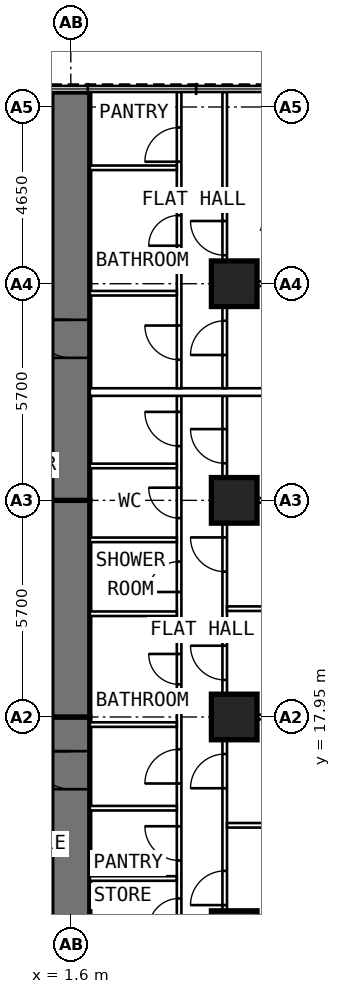
"""IFC4 building model, lengths in metres.
Left out: names, types, materials, properties, quantities, classifications, styles, units other than length and angle.
Written with IfcOpenShell. Run it as: python <this file> out.ifc"""

import sys

from ifc_helpers import new_model, si_unit, direction, frame, frame_2d, origin, origin_2d, place, context, subcontext, project, spatial, rectangle, extrude, element, fill, save


model = new_model("IFC4")
c1 = context("Model", 3, precision=1e-05, world=origin(), true_north=direction((0.0, 1.0)))
c2 = subcontext(c1, "Body", "Model", "MODEL_VIEW")
j1 = project(units=[si_unit("LENGTHUNIT", "METRE"), si_unit("PLANEANGLEUNIT", "RADIAN")], contexts=[c1])
p1 = place(None, origin())
s1 = spatial("IfcSite", under=j1, at=p1, CompositionType="ELEMENT")
p2 = place(p1, origin())
s2 = spatial("IfcBuilding", under=s1, at=p2, CompositionType="ELEMENT")
p3 = place(p2, frame((0.0, 0.0, 53.8)))
s3 = spatial("IfcBuildingStorey", under=s2, at=p3, CompositionType="ELEMENT", Elevation=53.8)
for number, where, z_axis, x_axis in (
    (1, (5.9, 12.25, 0.0), (0.0, 0.0, 1.0), (0.0, 1.0, 0.0)),
    (2, (5.9, 17.95, 0.0), (0.0, 0.0, 1.0), (0.0, 1.0, 0.0)),
    (3, (5.9, 23.65, 0.0), (0.0, 0.0, 1.0), (0.0, 1.0, 0.0)),
    (4, (5.9, 29.35, 0.0), (0.0, 0.0, 1.0), (0.0, 1.0, 0.0)),
):
    element("IfcColumn", number, at=place(p3, frame(where, z_axis=z_axis, x_axis=x_axis)), inside=s3, PredefinedType="COLUMN", context=c2, shape_type="SweptSolid", body=[
        extrude(rectangle(XDim=1.2, YDim=1.2, at=origin_2d()), origin(), (0.0, 0.0, 1.0), 3.6),
    ])
p4 = place(p3, frame((1.6, 9.6, 0.0), z_axis=(0.0, 0.0, 1.0), x_axis=(0.0, 1.0, 0.0)))
e5 = element("IfcWall", 5, at=p4, inside=s3, PredefinedType="SHEAR", context=c2, shape_type="SweptSolid", body=[
    extrude(rectangle(XDim=8.35, YDim=1.0, at=frame_2d((4.175, 0.0))), origin(), (0.0, 0.0, 1.0), 3.6),
])
p5 = place(p4, frame((6.45, 0.0, 0.0)))
e6 = element("IfcOpeningElement", 6, at=p5, cuts=e5, PredefinedType="OPENING", context=c2, shape_type="SweptSolid", body=[
    extrude(rectangle(XDim=1.0, YDim=2.1, at=frame_2d((0.5, 1.05))), frame((0.0, 0.512, 0.0), z_axis=(0.0, -1.0, 0.0), x_axis=(1.0, 0.0, 0.0)), (0.0, 0.0, 1.0), 1.024),
])
p6 = place(p3, frame((1.6, 17.95, 0.0), z_axis=(0.0, 0.0, 1.0), x_axis=(0.0, 1.0, 0.0)))
e7 = element("IfcWall", 7, at=p6, inside=s3, PredefinedType="SHEAR", context=c2, shape_type="SweptSolid", body=[
    extrude(rectangle(XDim=5.7, YDim=1.0, at=frame_2d((2.85, 0.0))), origin(), (0.0, 0.0, 1.0), 3.6),
])
p7 = place(p3, frame((1.6, 23.65, 0.0), z_axis=(0.0, 0.0, 1.0), x_axis=(0.0, 1.0, 0.0)))
e8 = element("IfcWall", 8, at=p7, inside=s3, PredefinedType="SHEAR", context=c2, shape_type="SweptSolid", body=[
    extrude(rectangle(XDim=10.745, YDim=1.0, at=frame_2d((5.373, 0.0))), origin(), (0.0, 0.0, 1.0), 3.6),
])
p8 = place(p7, frame((3.75, 0.0, 0.0)))
e9 = element("IfcOpeningElement", 9, at=p8, cuts=e8, PredefinedType="OPENING", context=c2, shape_type="SweptSolid", body=[
    extrude(rectangle(XDim=1.0, YDim=2.1, at=frame_2d((0.5, 1.05))), frame((0.0, 0.512, 0.0), z_axis=(0.0, -1.0, 0.0), x_axis=(1.0, 0.0, 0.0)), (0.0, 0.0, 1.0), 1.024),
])
p9 = place(p3, frame((4.45, 10.1, 0.0), z_axis=(0.0, 0.0, 1.0), x_axis=(0.0, 1.0, 0.0)))
e10 = element("IfcWall", 10, at=p9, inside=s3, PredefinedType="PARTITIONING", context=c2, shape_type="SweptSolid", body=[
    extrude(rectangle(XDim=16.3, YDim=0.12, at=frame_2d((8.15, 0.0))), origin(), (0.0, 0.0, 1.0), 3.35),
])
p10 = place(p9, frame((0.375, 0.0, 0.0)))
e11 = element("IfcOpeningElement", 11, at=p10, cuts=e10, PredefinedType="OPENING", context=c2, shape_type="SweptSolid", body=[
    extrude(rectangle(XDim=0.9, YDim=2.1, at=frame_2d((0.45, 1.05))), frame((0.0, 0.072, 0.0), z_axis=(0.0, -1.0, 0.0), x_axis=(1.0, 0.0, 0.0)), (0.0, 0.0, 1.0), 0.144),
])
p11 = place(p9, frame((2.275, 0.0, 0.0)))
e12 = element("IfcOpeningElement", 12, at=p11, cuts=e10, PredefinedType="OPENING", context=c2, shape_type="SweptSolid", body=[
    extrude(rectangle(XDim=0.8, YDim=2.1, at=frame_2d((0.4, 1.05))), frame((0.0, 0.072, 0.0), z_axis=(0.0, -1.0, 0.0), x_axis=(1.0, 0.0, 0.0)), (0.0, 0.0, 1.0), 0.144),
])
p12 = place(p9, frame((4.075, 0.0, 0.0)))
e13 = element("IfcOpeningElement", 13, at=p12, cuts=e10, PredefinedType="OPENING", context=c2, shape_type="SweptSolid", body=[
    extrude(rectangle(XDim=0.9, YDim=2.1, at=frame_2d((0.45, 1.05))), frame((0.0, 0.072, 0.0), z_axis=(0.0, -1.0, 0.0), x_axis=(1.0, 0.0, 0.0)), (0.0, 0.0, 1.0), 0.144),
])
p13 = place(p9, frame((6.1, 0.0, 0.0)))
e14 = element("IfcOpeningElement", 14, at=p13, cuts=e10, PredefinedType="OPENING", context=c2, shape_type="SweptSolid", body=[
    extrude(rectangle(XDim=0.9, YDim=2.1, at=frame_2d((0.45, 1.05))), frame((0.0, 0.072, 0.0), z_axis=(0.0, -1.0, 0.0), x_axis=(1.0, 0.0, 0.0)), (0.0, 0.0, 1.0), 0.144),
])
p14 = place(p9, frame((8.708, 0.0, 0.0)))
e15 = element("IfcOpeningElement", 15, at=p14, cuts=e10, PredefinedType="OPENING", context=c2, shape_type="SweptSolid", body=[
    extrude(rectangle(XDim=0.8, YDim=2.1, at=frame_2d((0.4, 1.05))), frame((0.0, 0.072, 0.0), z_axis=(0.0, -1.0, 0.0), x_axis=(1.0, 0.0, 0.0)), (0.0, 0.0, 1.0), 0.144),
])
p15 = place(p9, frame((11.139, 0.0, 0.0)))
e16 = element("IfcOpeningElement", 16, at=p15, cuts=e10, PredefinedType="OPENING", context=c2, shape_type="SweptSolid", body=[
    extrude(rectangle(XDim=0.8, YDim=2.1, at=frame_2d((0.4, 1.05))), frame((0.0, 0.072, 0.0), z_axis=(0.0, -1.0, 0.0), x_axis=(1.0, 0.0, 0.0)), (0.0, 0.0, 1.0), 0.144),
])
p16 = place(p9, frame((13.083, 0.0, 0.0)))
e17 = element("IfcOpeningElement", 17, at=p16, cuts=e10, PredefinedType="OPENING", context=c2, shape_type="SweptSolid", body=[
    extrude(rectangle(XDim=0.8, YDim=2.1, at=frame_2d((0.4, 1.05))), frame((0.0, 0.072, 0.0), z_axis=(0.0, -1.0, 0.0), x_axis=(1.0, 0.0, 0.0)), (0.0, 0.0, 1.0), 0.144),
])
p17 = place(p9, frame((14.978, 0.0, 0.0)))
e18 = element("IfcOpeningElement", 18, at=p17, cuts=e10, PredefinedType="OPENING", context=c2, shape_type="SweptSolid", body=[
    extrude(rectangle(XDim=0.9, YDim=2.1, at=frame_2d((0.45, 1.05))), frame((0.0, 0.072, 0.0), z_axis=(0.0, -1.0, 0.0), x_axis=(1.0, 0.0, 0.0)), (0.0, 0.0, 1.0), 0.144),
])
p18 = place(p3, frame((5.65, 9.6, 0.0), z_axis=(0.0, 0.0, 1.0), x_axis=(0.0, 1.0, 0.0)))
e19 = element("IfcWall", 19, at=p18, inside=s3, PredefinedType="PARTITIONING", context=c2, shape_type="SweptSolid", body=[
    extrude(rectangle(XDim=16.8, YDim=0.12, at=frame_2d((8.4, 0.0))), origin(), (0.0, 0.0, 1.0), 3.35),
])
p19 = place(p18, frame((3.4, 0.0, 0.0)))
e20 = element("IfcOpeningElement", 20, at=p19, cuts=e19, PredefinedType="OPENING", context=c2, shape_type="SweptSolid", body=[
    extrude(rectangle(XDim=0.9, YDim=2.1, at=frame_2d((0.45, 1.05))), frame((0.0, 0.072, 0.0), z_axis=(0.0, -1.0, 0.0), x_axis=(1.0, 0.0, 0.0)), (0.0, 0.0, 1.0), 0.144),
])
p20 = place(p18, frame((6.475, 0.0, 0.0)))
e21 = element("IfcOpeningElement", 21, at=p20, cuts=e19, PredefinedType="OPENING", context=c2, shape_type="SweptSolid", body=[
    extrude(rectangle(XDim=0.9, YDim=2.1, at=frame_2d((0.45, 1.05))), frame((0.0, 0.072, 0.0), z_axis=(0.0, -1.0, 0.0), x_axis=(1.0, 0.0, 0.0)), (0.0, 0.0, 1.0), 0.144),
])
p21 = place(p18, frame((9.325, 0.0, 0.0)))
e22 = element("IfcOpeningElement", 22, at=p21, cuts=e19, PredefinedType="OPENING", context=c2, shape_type="SweptSolid", body=[
    extrude(rectangle(XDim=0.9, YDim=2.1, at=frame_2d((0.45, 1.05))), frame((0.0, 0.072, 0.0), z_axis=(0.0, -1.0, 0.0), x_axis=(1.0, 0.0, 0.0)), (0.0, 0.0, 1.0), 0.144),
])
p22 = place(p18, frame((12.175, 0.0, 0.0)))
e23 = element("IfcOpeningElement", 23, at=p22, cuts=e19, PredefinedType="OPENING", context=c2, shape_type="SweptSolid", body=[
    extrude(rectangle(XDim=0.9, YDim=2.1, at=frame_2d((0.45, 1.05))), frame((0.0, 0.072, 0.0), z_axis=(0.0, -1.0, 0.0), x_axis=(1.0, 0.0, 0.0)), (0.0, 0.0, 1.0), 0.144),
])
p23 = place(p18, frame((15.025, 0.0, 0.0)))
e24 = element("IfcOpeningElement", 24, at=p23, cuts=e19, PredefinedType="OPENING", context=c2, shape_type="SweptSolid", body=[
    extrude(rectangle(XDim=0.9, YDim=2.1, at=frame_2d((0.45, 1.05))), frame((0.0, 0.072, 0.0), z_axis=(0.0, -1.0, 0.0), x_axis=(1.0, 0.0, 0.0)), (0.0, 0.0, 1.0), 0.144),
])
p24 = place(p3, frame((5.71, 15.1, 0.0), z_axis=(0.0, 0.0, 1.0), x_axis=(1.0, 0.0, 0.0)))
e25 = element("IfcWall", 25, at=p24, inside=s3, PredefinedType="PARTITIONING", context=c2, shape_type="SweptSolid", body=[
    extrude(rectangle(XDim=4.99, YDim=0.12, at=frame_2d((2.495, 0.0))), origin(), (0.0, 0.0, 1.0), 3.35),
])
p25 = place(p3, frame((5.71, 17.95, 0.0), z_axis=(0.0, 0.0, 1.0), x_axis=(1.0, 0.0, 0.0)))
e26 = element("IfcWall", 26, at=p25, inside=s3, PredefinedType="PARTITIONING", context=c2, shape_type="SweptSolid", body=[
    extrude(rectangle(XDim=4.99, YDim=0.12, at=frame_2d((2.495, 0.0))), origin(), (0.0, 0.0, 1.0), 2.45),
])
p26 = place(p3, frame((5.71, 20.8, 0.0), z_axis=(0.0, 0.0, 1.0), x_axis=(1.0, 0.0, 0.0)))
e27 = element("IfcWall", 27, at=p26, inside=s3, PredefinedType="PARTITIONING", context=c2, shape_type="SweptSolid", body=[
    extrude(rectangle(XDim=4.99, YDim=0.12, at=frame_2d((2.495, 0.0))), origin(), (0.0, 0.0, 1.0), 3.35),
])
p27 = place(p3, frame((5.71, 23.65, 0.0), z_axis=(0.0, 0.0, 1.0), x_axis=(1.0, 0.0, 0.0)))
e28 = element("IfcWall", 28, at=p27, inside=s3, PredefinedType="PARTITIONING", context=c2, shape_type="SweptSolid", body=[
    extrude(rectangle(XDim=4.99, YDim=0.12, at=frame_2d((2.495, 0.0))), origin(), (0.0, 0.0, 1.0), 2.45),
])
for number, where, z_axis, x_axis in (
    (29, (2.1, 13.7, 0.0), (0.0, 0.0, 1.0), (1.0, 0.0, 0.0)),
    (30, (2.1, 15.55, 0.0), (0.0, 0.0, 1.0), (1.0, 0.0, 0.0)),
):
    element("IfcWall", number, at=place(p3, frame(where, z_axis=z_axis, x_axis=x_axis)), inside=s3, PredefinedType="PARTITIONING", context=c2, shape_type="SweptSolid", body=[
        extrude(rectangle(XDim=2.29, YDim=0.12, at=frame_2d((1.145, 0.0))), origin(), (0.0, 0.0, 1.0), 3.35),
    ])
p28 = place(p3, frame((2.1, 17.75, 0.0), z_axis=(0.0, 0.0, 1.0), x_axis=(1.0, 0.0, 0.0)))
e31 = element("IfcWall", 31, at=p28, inside=s3, PredefinedType="PARTITIONING", context=c2, shape_type="SweptSolid", body=[
    extrude(rectangle(XDim=2.29, YDim=0.12, at=frame_2d((1.145, 0.0))), origin(), (0.0, 0.0, 1.0), 2.45),
])
for number, where, z_axis, x_axis in (
    (32, (2.1, 20.667, 0.0), (0.0, 0.0, 1.0), (1.0, 0.0, 0.0)),
    (33, (2.1, 22.611, 0.0), (0.0, 0.0, 1.0), (1.0, 0.0, 0.0)),
    (34, (2.1, 24.556, 0.0), (0.0, 0.0, 1.0), (1.0, 0.0, 0.0)),
):
    element("IfcWall", number, at=place(p3, frame(where, z_axis=z_axis, x_axis=x_axis)), inside=s3, PredefinedType="PARTITIONING", context=c2, shape_type="SweptSolid", body=[
        extrude(rectangle(XDim=2.29, YDim=0.12, at=frame_2d((1.145, 0.0))), origin(), (0.0, 0.0, 1.0), 3.35),
    ])
p29 = place(p3, frame((4.45, 26.6, 0.0), z_axis=(0.0, 0.0, 1.0), x_axis=(0.0, 1.0, 0.0)))
e35 = element("IfcWall", 35, at=p29, inside=s3, PredefinedType="PARTITIONING", context=c2, shape_type="SweptSolid", body=[
    extrude(rectangle(XDim=7.795, YDim=0.12, at=frame_2d((3.897, 0.0))), origin(), (0.0, 0.0, 1.0), 3.35),
])
p30 = place(p29, frame((0.75, 0.0, 0.0)))
e36 = element("IfcOpeningElement", 36, at=p30, cuts=e35, PredefinedType="OPENING", context=c2, shape_type="SweptSolid", body=[
    extrude(rectangle(XDim=0.9, YDim=2.1, at=frame_2d((0.45, 1.05))), frame((0.0, 0.072, 0.0), z_axis=(0.0, -1.0, 0.0), x_axis=(1.0, 0.0, 0.0)), (0.0, 0.0, 1.0), 0.144),
])
p31 = place(p29, frame((3.75, 0.0, 0.0)))
e37 = element("IfcOpeningElement", 37, at=p31, cuts=e35, PredefinedType="OPENING", context=c2, shape_type="SweptSolid", body=[
    extrude(rectangle(XDim=0.8, YDim=2.1, at=frame_2d((0.4, 1.05))), frame((0.0, 0.072, 0.0), z_axis=(0.0, -1.0, 0.0), x_axis=(1.0, 0.0, 0.0)), (0.0, 0.0, 1.0), 0.144),
])
p32 = place(p29, frame((5.96, 0.0, 0.0)))
e38 = element("IfcOpeningElement", 38, at=p32, cuts=e35, PredefinedType="OPENING", context=c2, shape_type="SweptSolid", body=[
    extrude(rectangle(XDim=0.9, YDim=2.1, at=frame_2d((0.45, 1.05))), frame((0.0, 0.072, 0.0), z_axis=(0.0, -1.0, 0.0), x_axis=(1.0, 0.0, 0.0)), (0.0, 0.0, 1.0), 0.144),
])
p33 = place(p3, frame((5.65, 26.6, 0.0), z_axis=(0.0, 0.0, 1.0), x_axis=(0.0, 1.0, 0.0)))
e39 = element("IfcWall", 39, at=p33, inside=s3, PredefinedType="PARTITIONING", context=c2, shape_type="SweptSolid", body=[
    extrude(rectangle(XDim=7.795, YDim=0.12, at=frame_2d((3.897, 0.0))), origin(), (0.0, 0.0, 1.0), 3.35),
])
p34 = place(p33, frame((0.875, 0.0, 0.0)))
e40 = element("IfcOpeningElement", 40, at=p34, cuts=e39, PredefinedType="OPENING", context=c2, shape_type="SweptSolid", body=[
    extrude(rectangle(XDim=0.9, YDim=2.1, at=frame_2d((0.45, 1.05))), frame((0.0, 0.072, 0.0), z_axis=(0.0, -1.0, 0.0), x_axis=(1.0, 0.0, 0.0)), (0.0, 0.0, 1.0), 0.144),
])
p35 = place(p33, frame((3.5, 0.0, 0.0)))
e41 = element("IfcOpeningElement", 41, at=p35, cuts=e39, PredefinedType="OPENING", context=c2, shape_type="SweptSolid", body=[
    extrude(rectangle(XDim=0.9, YDim=2.1, at=frame_2d((0.45, 1.05))), frame((0.0, 0.072, 0.0), z_axis=(0.0, -1.0, 0.0), x_axis=(1.0, 0.0, 0.0)), (0.0, 0.0, 1.0), 0.144),
])
p36 = place(p3, frame((5.71, 29.35, 0.0), z_axis=(0.0, 0.0, 1.0), x_axis=(1.0, 0.0, 0.0)))
e42 = element("IfcWall", 42, at=p36, inside=s3, PredefinedType="PARTITIONING", context=c2, shape_type="SweptSolid", body=[
    extrude(rectangle(XDim=4.99, YDim=0.12, at=frame_2d((2.495, 0.0))), origin(), (0.0, 0.0, 1.0), 2.45),
])
p37 = place(p3, frame((2.1, 29.1, 0.0), z_axis=(0.0, 0.0, 1.0), x_axis=(1.0, 0.0, 0.0)))
e43 = element("IfcWall", 43, at=p37, inside=s3, PredefinedType="PARTITIONING", context=c2, shape_type="SweptSolid", body=[
    extrude(rectangle(XDim=2.29, YDim=0.12, at=frame_2d((1.145, 0.0))), origin(), (0.0, 0.0, 1.0), 2.45),
])
p38 = place(p3, frame((2.1, 32.4, 0.0), z_axis=(0.0, 0.0, 1.0), x_axis=(1.0, 0.0, 0.0)))
e44 = element("IfcWall", 44, at=p38, inside=s3, PredefinedType="PARTITIONING", context=c2, shape_type="SweptSolid", body=[
    extrude(rectangle(XDim=2.29, YDim=0.12, at=frame_2d((1.145, 0.0))), origin(), (0.0, 0.0, 1.0), 3.35),
])
p39 = place(p3, frame((2.1, 26.5, 0.0), z_axis=(0.0, 0.0, 1.0), x_axis=(1.0, 0.0, 0.0)))
e45 = element("IfcWall", 45, at=p39, inside=s3, PredefinedType="PARTITIONING", context=c2, shape_type="SweptSolid", body=[
    extrude(rectangle(XDim=8.6, YDim=0.2, at=frame_2d((4.3, 0.0))), origin(), (0.0, 0.0, 1.0), 3.35),
])
p40 = place(p5, origin())
e46 = element("IfcDoor", 46, at=p40, inside=s3, OperationType="SINGLE_SWING_RIGHT", PredefinedType="DOOR", context=c2, shape_type="SweptSolid", body=[
    extrude(rectangle(XDim=1.0, YDim=2.1, at=frame_2d((0.5, 1.05))), frame((0.0, 0.25, 0.0), z_axis=(0.0, -1.0, 0.0), x_axis=(1.0, 0.0, 0.0)), (0.0, 0.0, 1.0), 0.5),
])
fill(e6, e46)
p41 = place(p19, origin())
e47 = element("IfcDoor", 47, at=p41, inside=s3, OperationType="SINGLE_SWING_LEFT", PredefinedType="DOOR", context=c2, shape_type="SweptSolid", body=[
    extrude(rectangle(XDim=0.9, YDim=2.1, at=frame_2d((0.45, 1.05))), frame((0.0, 0.025, 0.0), z_axis=(0.0, -1.0, 0.0), x_axis=(1.0, 0.0, 0.0)), (0.0, 0.0, 1.0), 0.05),
])
fill(e20, e47)
p42 = place(p20, origin())
e48 = element("IfcDoor", 48, at=p42, inside=s3, OperationType="SINGLE_SWING_LEFT", PredefinedType="DOOR", context=c2, shape_type="SweptSolid", body=[
    extrude(rectangle(XDim=0.9, YDim=2.1, at=frame_2d((0.45, 1.05))), frame((0.0, 0.025, 0.0), z_axis=(0.0, -1.0, 0.0), x_axis=(1.0, 0.0, 0.0)), (0.0, 0.0, 1.0), 0.05),
])
fill(e21, e48)
p43 = place(p21, origin())
e49 = element("IfcDoor", 49, at=p43, inside=s3, OperationType="SINGLE_SWING_RIGHT", PredefinedType="DOOR", context=c2, shape_type="SweptSolid", body=[
    extrude(rectangle(XDim=0.9, YDim=2.1, at=frame_2d((0.45, 1.05))), frame((0.0, 0.025, 0.0), z_axis=(0.0, -1.0, 0.0), x_axis=(1.0, 0.0, 0.0)), (0.0, 0.0, 1.0), 0.05),
])
fill(e22, e49)
p44 = place(p22, origin())
e50 = element("IfcDoor", 50, at=p44, inside=s3, OperationType="SINGLE_SWING_RIGHT", PredefinedType="DOOR", context=c2, shape_type="SweptSolid", body=[
    extrude(rectangle(XDim=0.9, YDim=2.1, at=frame_2d((0.45, 1.05))), frame((0.0, 0.025, 0.0), z_axis=(0.0, -1.0, 0.0), x_axis=(1.0, 0.0, 0.0)), (0.0, 0.0, 1.0), 0.05),
])
fill(e23, e50)
p45 = place(p23, origin())
e51 = element("IfcDoor", 51, at=p45, inside=s3, OperationType="SINGLE_SWING_RIGHT", PredefinedType="DOOR", context=c2, shape_type="SweptSolid", body=[
    extrude(rectangle(XDim=0.9, YDim=2.1, at=frame_2d((0.45, 1.05))), frame((0.0, 0.025, 0.0), z_axis=(0.0, -1.0, 0.0), x_axis=(1.0, 0.0, 0.0)), (0.0, 0.0, 1.0), 0.05),
])
fill(e24, e51)
p46 = place(p11, origin())
e52 = element("IfcDoor", 52, at=p46, inside=s3, OperationType="SINGLE_SWING_LEFT", PredefinedType="DOOR", context=c2, shape_type="SweptSolid", body=[
    extrude(rectangle(XDim=0.8, YDim=2.1, at=frame_2d((0.4, 1.05))), frame((0.0, 0.025, 0.0), z_axis=(0.0, -1.0, 0.0), x_axis=(1.0, 0.0, 0.0)), (0.0, 0.0, 1.0), 0.05),
])
fill(e12, e52)
p47 = place(p12, origin())
e53 = element("IfcDoor", 53, at=p47, inside=s3, OperationType="SINGLE_SWING_RIGHT", PredefinedType="DOOR", context=c2, shape_type="SweptSolid", body=[
    extrude(rectangle(XDim=0.9, YDim=2.1, at=frame_2d((0.45, 1.05))), frame((0.0, 0.025, 0.0), z_axis=(0.0, -1.0, 0.0), x_axis=(1.0, 0.0, 0.0)), (0.0, 0.0, 1.0), 0.05),
])
fill(e13, e53)
p48 = place(p13, origin())
e54 = element("IfcDoor", 54, at=p48, inside=s3, OperationType="SINGLE_SWING_LEFT", PredefinedType="DOOR", context=c2, shape_type="SweptSolid", body=[
    extrude(rectangle(XDim=0.9, YDim=2.1, at=frame_2d((0.45, 1.05))), frame((0.0, 0.025, 0.0), z_axis=(0.0, -1.0, 0.0), x_axis=(1.0, 0.0, 0.0)), (0.0, 0.0, 1.0), 0.05),
])
fill(e14, e54)
p49 = place(p14, origin())
e55 = element("IfcDoor", 55, at=p49, inside=s3, OperationType="SINGLE_SWING_RIGHT", PredefinedType="DOOR", context=c2, shape_type="SweptSolid", body=[
    extrude(rectangle(XDim=0.8, YDim=2.1, at=frame_2d((0.4, 1.05))), frame((0.0, 0.025, 0.0), z_axis=(0.0, -1.0, 0.0), x_axis=(1.0, 0.0, 0.0)), (0.0, 0.0, 1.0), 0.05),
])
fill(e15, e55)
p50 = place(p15, origin())
e56 = element("IfcDoor", 56, at=p50, inside=s3, OperationType="SINGLE_SWING_LEFT", PredefinedType="DOOR", context=c2, shape_type="SweptSolid", body=[
    extrude(rectangle(XDim=0.8, YDim=2.1, at=frame_2d((0.4, 1.05))), frame((0.0, 0.025, 0.0), z_axis=(0.0, -1.0, 0.0), x_axis=(1.0, 0.0, 0.0)), (0.0, 0.0, 1.0), 0.05),
])
fill(e16, e56)
p51 = place(p16, origin())
e57 = element("IfcDoor", 57, at=p51, inside=s3, OperationType="SINGLE_SWING_RIGHT", PredefinedType="DOOR", context=c2, shape_type="SweptSolid", body=[
    extrude(rectangle(XDim=0.8, YDim=2.1, at=frame_2d((0.4, 1.05))), frame((0.0, 0.025, 0.0), z_axis=(0.0, -1.0, 0.0), x_axis=(1.0, 0.0, 0.0)), (0.0, 0.0, 1.0), 0.05),
])
fill(e17, e57)
p52 = place(p17, origin())
e58 = element("IfcDoor", 58, at=p52, inside=s3, OperationType="SINGLE_SWING_RIGHT", PredefinedType="DOOR", context=c2, shape_type="SweptSolid", body=[
    extrude(rectangle(XDim=0.9, YDim=2.1, at=frame_2d((0.45, 1.05))), frame((0.0, 0.025, 0.0), z_axis=(0.0, -1.0, 0.0), x_axis=(1.0, 0.0, 0.0)), (0.0, 0.0, 1.0), 0.05),
])
fill(e18, e58)
p53 = place(p8, origin())
e59 = element("IfcDoor", 59, at=p53, inside=s3, OperationType="SINGLE_SWING_RIGHT", PredefinedType="DOOR", context=c2, shape_type="SweptSolid", body=[
    extrude(rectangle(XDim=1.0, YDim=2.1, at=frame_2d((0.5, 1.05))), frame((0.0, 0.25, 0.0), z_axis=(0.0, -1.0, 0.0), x_axis=(1.0, 0.0, 0.0)), (0.0, 0.0, 1.0), 0.5),
])
fill(e9, e59)
p54 = place(p34, origin())
e60 = element("IfcDoor", 60, at=p54, inside=s3, OperationType="SINGLE_SWING_LEFT", PredefinedType="DOOR", context=c2, shape_type="SweptSolid", body=[
    extrude(rectangle(XDim=0.9, YDim=2.1, at=frame_2d((0.45, 1.05))), frame((0.0, 0.025, 0.0), z_axis=(0.0, -1.0, 0.0), x_axis=(1.0, 0.0, 0.0)), (0.0, 0.0, 1.0), 0.05),
])
fill(e40, e60)
p55 = place(p35, origin())
e61 = element("IfcDoor", 61, at=p55, inside=s3, OperationType="SINGLE_SWING_RIGHT", PredefinedType="DOOR", context=c2, shape_type="SweptSolid", body=[
    extrude(rectangle(XDim=0.9, YDim=2.1, at=frame_2d((0.45, 1.05))), frame((0.0, 0.025, 0.0), z_axis=(0.0, -1.0, 0.0), x_axis=(1.0, 0.0, 0.0)), (0.0, 0.0, 1.0), 0.05),
])
fill(e41, e61)
p56 = place(p30, origin())
e62 = element("IfcDoor", 62, at=p56, inside=s3, OperationType="SINGLE_SWING_RIGHT", PredefinedType="DOOR", context=c2, shape_type="SweptSolid", body=[
    extrude(rectangle(XDim=0.9, YDim=2.1, at=frame_2d((0.45, 1.05))), frame((0.0, 0.025, 0.0), z_axis=(0.0, -1.0, 0.0), x_axis=(1.0, 0.0, 0.0)), (0.0, 0.0, 1.0), 0.05),
])
fill(e36, e62)
p57 = place(p31, origin())
e63 = element("IfcDoor", 63, at=p57, inside=s3, OperationType="SINGLE_SWING_LEFT", PredefinedType="DOOR", context=c2, shape_type="SweptSolid", body=[
    extrude(rectangle(XDim=0.8, YDim=2.1, at=frame_2d((0.4, 1.05))), frame((0.0, 0.025, 0.0), z_axis=(0.0, -1.0, 0.0), x_axis=(1.0, 0.0, 0.0)), (0.0, 0.0, 1.0), 0.05),
])
fill(e37, e63)
p58 = place(p32, origin())
e64 = element("IfcDoor", 64, at=p58, inside=s3, OperationType="SINGLE_SWING_LEFT", PredefinedType="DOOR", context=c2, shape_type="SweptSolid", body=[
    extrude(rectangle(XDim=0.9, YDim=2.1, at=frame_2d((0.45, 1.05))), frame((0.0, 0.025, 0.0), z_axis=(0.0, -1.0, 0.0), x_axis=(1.0, 0.0, 0.0)), (0.0, 0.0, 1.0), 0.05),
])
fill(e38, e64)
save(model, sys.argv[1])
